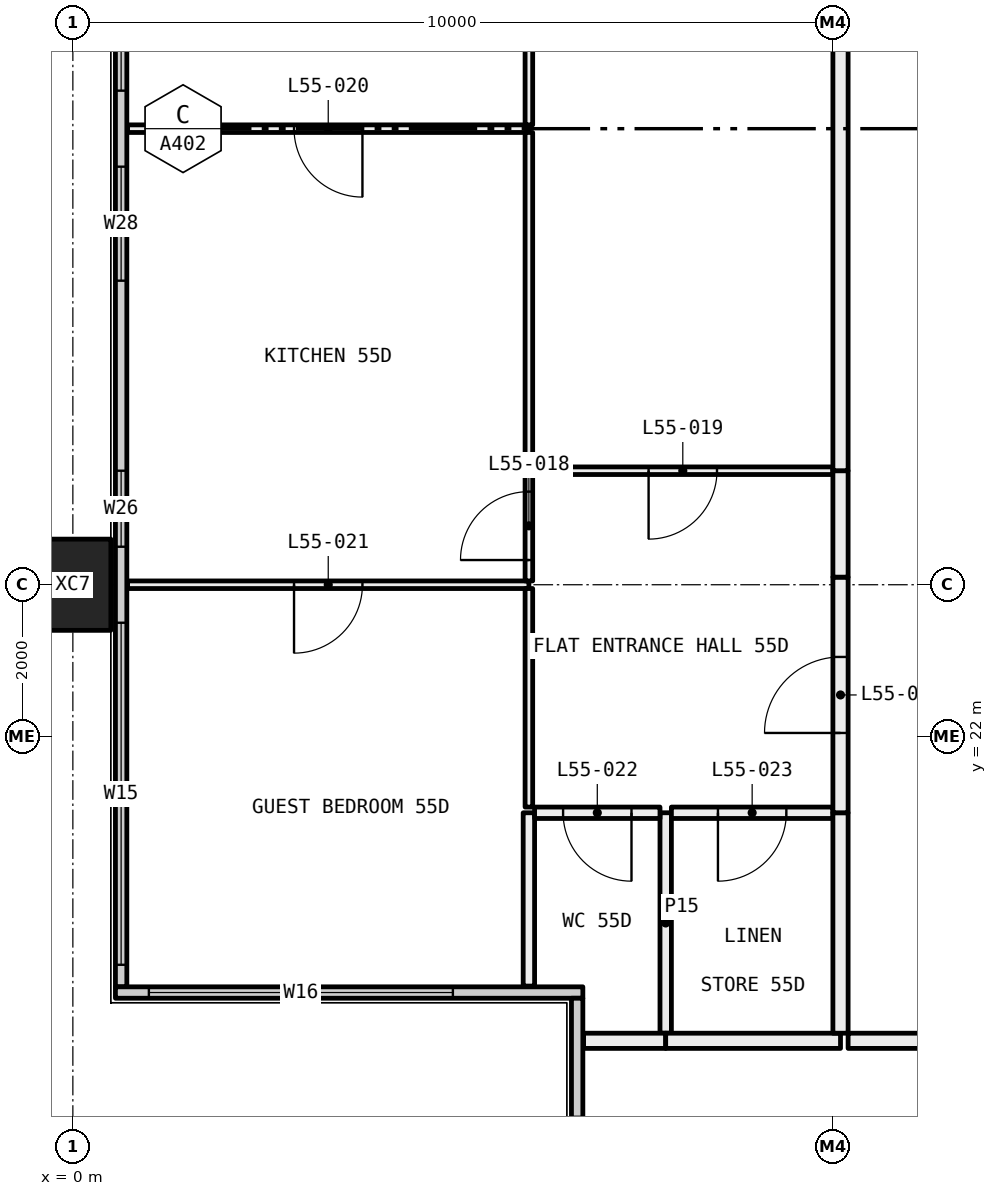
"""IFC4 building model, lengths in metres.
Left out: names, types, materials, properties, quantities, classifications, styles, units other than length and angle.
Written with IfcOpenShell. Run it as: python <this file> out.ifc"""

import sys

from ifc_helpers import new_model, si_unit, direction, frame, frame_2d, origin, origin_2d, place, context, subcontext, project, spatial, rectangle, hollow_rectangle, extrude, element, fill, save


model = new_model("IFC4")
c1 = context("Model", 3, precision=1e-05, world=origin(), true_north=direction((0.0, 1.0)))
c2 = subcontext(c1, "Body", "Model", "MODEL_VIEW")
j1 = project(units=[si_unit("LENGTHUNIT", "METRE"), si_unit("PLANEANGLEUNIT", "RADIAN")], contexts=[c1])
p1 = place(None, origin())
s1 = spatial("IfcSite", under=j1, at=p1, CompositionType="ELEMENT")
p2 = place(p1, origin())
s2 = spatial("IfcBuilding", under=s1, at=p2, CompositionType="ELEMENT")
p3 = place(p2, frame((0.0, 0.0, 206.55)))
s3 = spatial("IfcBuildingStorey", under=s2, at=p3, CompositionType="ELEMENT", Elevation=206.55)
p4 = place(p3, frame((0.0, 24.0, -0.4), z_axis=(0.0, 0.0, 1.0), x_axis=(0.0, 1.0, 0.0)))
e1 = element("IfcColumn", 1, at=p4, inside=s3, PredefinedType="COLUMN", context=c2, shape_type="SweptSolid", body=[
    extrude(hollow_rectangle(XDim=1.2, YDim=1.0, WallThickness=0.045, at=origin_2d()), origin(), (0.0, 0.0, 1.0), 3.45),
])
p5 = place(p3, frame((0.635, 18.71, 0.0), z_axis=(0.0, 0.0, 1.0), x_axis=(0.0, 1.0, 0.0)))
e2 = element("IfcWall", 2, at=p5, inside=s3, PredefinedType="ELEMENTEDWALL", context=c2, shape_type="SweptSolid", body=[
    extrude(rectangle(XDim=22.58, YDim=0.15, at=frame_2d((11.29, 0.0))), origin(), (0.0, 0.0, 1.0), 3.05),
])
p6 = place(p5, frame((0.29, 0.0, 0.45)))
e3 = element("IfcOpeningElement", 3, at=p6, cuts=e2, PredefinedType="OPENING", context=c2, shape_type="SweptSolid", body=[
    extrude(rectangle(XDim=4.5, YDim=2.55, at=frame_2d((2.25, 1.275))), frame((0.0, 0.085, 0.0), z_axis=(0.0, -1.0, 0.0), x_axis=(1.0, 0.0, 0.0)), (0.0, 0.0, 1.0), 0.17),
])
p7 = place(p5, frame((5.79, 0.0, 0.45)))
e4 = element("IfcOpeningElement", 4, at=p7, cuts=e2, PredefinedType="OPENING", context=c2, shape_type="SweptSolid", body=[
    extrude(rectangle(XDim=1.0, YDim=2.55, at=frame_2d((0.5, 1.275))), frame((0.0, 0.085, 0.0), z_axis=(0.0, -1.0, 0.0), x_axis=(1.0, 0.0, 0.0)), (0.0, 0.0, 1.0), 0.17),
])
p8 = place(p5, frame((9.29, 0.0, 0.45)))
e5 = element("IfcOpeningElement", 5, at=p8, cuts=e2, PredefinedType="OPENING", context=c2, shape_type="SweptSolid", body=[
    extrude(rectangle(XDim=1.5, YDim=2.55, at=frame_2d((0.75, 1.275))), frame((0.0, 0.085, 0.0), z_axis=(0.0, -1.0, 0.0), x_axis=(1.0, 0.0, 0.0)), (0.0, 0.0, 1.0), 0.17),
])
p9 = place(p5, frame((11.79, 0.0, 0.45)))
e6 = element("IfcOpeningElement", 6, at=p9, cuts=e2, PredefinedType="OPENING", context=c2, shape_type="SweptSolid", body=[
    extrude(rectangle(XDim=1.5, YDim=2.55, at=frame_2d((0.75, 1.275))), frame((0.0, 0.085, 0.0), z_axis=(0.0, -1.0, 0.0), x_axis=(1.0, 0.0, 0.0)), (0.0, 0.0, 1.0), 0.17),
])
p10 = place(p5, frame((15.79, 0.0, 0.45)))
e7 = element("IfcOpeningElement", 7, at=p10, cuts=e2, PredefinedType="OPENING", context=c2, shape_type="SweptSolid", body=[
    extrude(rectangle(XDim=1.0, YDim=2.55, at=frame_2d((0.5, 1.275))), frame((0.0, 0.085, 0.0), z_axis=(0.0, -1.0, 0.0), x_axis=(1.0, 0.0, 0.0)), (0.0, 0.0, 1.0), 0.17),
])
p11 = place(p5, frame((17.79, 0.0, 0.45)))
e8 = element("IfcOpeningElement", 8, at=p11, cuts=e2, PredefinedType="OPENING", context=c2, shape_type="SweptSolid", body=[
    extrude(rectangle(XDim=4.5, YDim=2.55, at=frame_2d((2.25, 1.275))), frame((0.0, 0.085, 0.0), z_axis=(0.0, -1.0, 0.0), x_axis=(1.0, 0.0, 0.0)), (0.0, 0.0, 1.0), 0.17),
])
p12 = place(p3, frame((0.56, 18.635, 0.0), z_axis=(0.0, 0.0, 1.0), x_axis=(1.0, 0.0, 0.0)))
e9 = element("IfcWall", 9, at=p12, inside=s3, PredefinedType="ELEMENTEDWALL", context=c2, shape_type="SweptSolid", body=[
    extrude(rectangle(XDim=6.15, YDim=0.15, at=frame_2d((3.075, 0.0))), origin(), (0.0, 0.0, 1.0), 3.05),
])
p13 = place(p12, frame((0.44, 0.0, 0.45)))
e10 = element("IfcOpeningElement", 10, at=p13, cuts=e9, PredefinedType="OPENING", context=c2, shape_type="SweptSolid", body=[
    extrude(rectangle(XDim=4.0, YDim=2.55, at=frame_2d((2.0, 1.275))), frame((0.0, 0.085, 0.0), z_axis=(0.0, -1.0, 0.0), x_axis=(1.0, 0.0, 0.0)), (0.0, 0.0, 1.0), 0.17),
])
p14 = place(p3, frame((6.635, 12.71, 0.0), z_axis=(0.0, 0.0, 1.0), x_axis=(0.0, 1.0, 0.0)))
e11 = element("IfcWall", 11, at=p14, inside=s3, PredefinedType="ELEMENTEDWALL", context=c2, shape_type="SweptSolid", body=[
    extrude(rectangle(XDim=5.85, YDim=0.15, at=frame_2d((2.925, 0.0))), origin(), (0.0, 0.0, 1.0), 3.05),
])
p15 = place(p14, frame((0.29, 0.0, 0.45)))
e12 = element("IfcOpeningElement", 12, at=p15, cuts=e11, PredefinedType="OPENING", context=c2, shape_type="SweptSolid", body=[
    extrude(rectangle(XDim=4.0, YDim=2.55, at=frame_2d((2.0, 1.275))), frame((0.0, 0.085, 0.0), z_axis=(0.0, -1.0, 0.0), x_axis=(1.0, 0.0, 0.0)), (0.0, 0.0, 1.0), 0.17),
])
p16 = place(p3, frame((6.0, 24.0, 0.0), z_axis=(0.0, 0.0, 1.0), x_axis=(-1.0, 0.0, 0.0)))
e13 = element("IfcWall", 13, at=p16, inside=s3, PredefinedType="PARTITIONING", context=c2, shape_type="SweptSolid", body=[
    extrude(rectangle(XDim=5.28, YDim=0.1, at=frame_2d((2.64, 0.0))), origin(), (0.0, 0.0, 1.0), 2.45),
])
p17 = place(p16, frame((2.19, 0.0, 0.0)))
e14 = element("IfcOpeningElement", 14, at=p17, cuts=e13, PredefinedType="OPENING", context=c2, shape_type="SweptSolid", body=[
    extrude(rectangle(XDim=0.9, YDim=2.1, at=frame_2d((0.45, 1.05))), frame((0.0, 0.06, 0.0), z_axis=(0.0, -1.0, 0.0), x_axis=(1.0, 0.0, 0.0)), (0.0, 0.0, 1.0), 0.12),
])
p18 = place(p3, frame((6.0, 18.72, 0.0), z_axis=(0.0, 0.0, 1.0), x_axis=(0.0, 1.0, 0.0)))
e15 = element("IfcWall", 15, at=p18, inside=s3, PredefinedType="PARTITIONING", context=c2, shape_type="SweptSolid", body=[
    extrude(rectangle(XDim=2.28, YDim=0.15, at=frame_2d((1.14, 0.0))), origin(), (0.0, 0.0, 1.0), 3.05),
])
p19 = place(p3, frame((6.0, 21.075, 0.0), z_axis=(0.0, 0.0, 1.0), x_axis=(0.0, 1.0, 0.0)))
e16 = element("IfcWall", 16, at=p19, inside=s3, PredefinedType="PARTITIONING", context=c2, shape_type="SweptSolid", body=[
    extrude(rectangle(XDim=2.875, YDim=0.1, at=frame_2d((1.438, 0.0))), origin(), (0.0, 0.0, 1.0), 2.45),
])
p20 = place(p3, frame((6.0, 30.0, 0.0), z_axis=(0.0, 0.0, 1.0), x_axis=(-1.0, 0.0, 0.0)))
e17 = element("IfcWall", 17, at=p20, inside=s3, PredefinedType="PARTITIONING", context=c2, shape_type="SweptSolid", body=[
    extrude(rectangle(XDim=5.28, YDim=0.1, at=frame_2d((2.64, 0.0))), origin(), (0.0, 0.0, 1.0), 3.05),
])
p21 = place(p20, frame((2.19, 0.0, 0.0)))
e18 = element("IfcOpeningElement", 18, at=p21, cuts=e17, PredefinedType="OPENING", context=c2, shape_type="SweptSolid", body=[
    extrude(rectangle(XDim=0.9, YDim=2.1, at=frame_2d((0.45, 1.05))), frame((0.0, 0.06, 0.0), z_axis=(0.0, -1.0, 0.0), x_axis=(1.0, 0.0, 0.0)), (0.0, 0.0, 1.0), 0.12),
])
p22 = place(p3, frame((6.0, 24.05, 0.0), z_axis=(0.0, 0.0, 1.0), x_axis=(0.0, 1.0, 0.0)))
e19 = element("IfcWall", 19, at=p22, inside=s3, PredefinedType="PARTITIONING", context=c2, shape_type="SweptSolid", body=[
    extrude(rectangle(XDim=1.45, YDim=0.1, at=frame_2d((0.725, 0.0))), origin(), (0.0, 0.0, 1.0), 2.45),
])
p23 = place(p22, frame((0.275, 0.0, 0.0)))
e20 = element("IfcOpeningElement", 20, at=p23, cuts=e19, PredefinedType="OPENING", context=c2, shape_type="SweptSolid", body=[
    extrude(rectangle(XDim=0.9, YDim=2.1, at=frame_2d((0.45, 1.05))), frame((0.0, 0.06, 0.0), z_axis=(0.0, -1.0, 0.0), x_axis=(1.0, 0.0, 0.0)), (0.0, 0.0, 1.0), 0.12),
])
p24 = place(p3, frame((6.0, 25.5, 0.0), z_axis=(0.0, 0.0, 1.0), x_axis=(0.0, 1.0, 0.0)))
e21 = element("IfcWall", 21, at=p24, inside=s3, PredefinedType="PARTITIONING", context=c2, shape_type="SweptSolid", body=[
    extrude(rectangle(XDim=4.45, YDim=0.1, at=frame_2d((2.225, 0.0))), origin(), (0.0, 0.0, 1.0), 3.05),
])
p25 = place(p3, frame((6.0, 30.05, 0.0), z_axis=(0.0, 0.0, 1.0), x_axis=(0.0, 1.0, 0.0)))
e22 = element("IfcWall", 22, at=p25, inside=s3, PredefinedType="PARTITIONING", context=c2, shape_type="SweptSolid", body=[
    extrude(rectangle(XDim=6.05, YDim=0.1, at=frame_2d((3.025, 0.0))), origin(), (0.0, 0.0, 1.0), 2.45),
])
p26 = place(p3, frame((7.8, 18.1, 0.0), z_axis=(0.0, 0.0, 1.0), x_axis=(0.0, 1.0, 0.0)))
e23 = element("IfcWall", 23, at=p26, inside=s3, PredefinedType="PARTITIONING", context=c2, shape_type="SweptSolid", body=[
    extrude(rectangle(XDim=2.9, YDim=0.15, at=frame_2d((1.45, 0.0))), origin(), (0.0, 0.0, 1.0), 3.05),
])
p27 = place(p3, frame((7.725, 21.0, 0.0), z_axis=(0.0, 0.0, 1.0), x_axis=(-1.0, 0.0, 0.0)))
e24 = element("IfcWall", 24, at=p27, inside=s3, PredefinedType="PARTITIONING", context=c2, shape_type="SweptSolid", body=[
    extrude(rectangle(XDim=1.65, YDim=0.15, at=frame_2d((0.825, 0.0))), origin(), (0.0, 0.0, 1.0), 3.05),
])
p28 = place(p27, frame((0.375, 0.0, 0.0)))
e25 = element("IfcOpeningElement", 25, at=p28, cuts=e24, PredefinedType="OPENING", context=c2, shape_type="SweptSolid", body=[
    extrude(rectangle(XDim=0.9, YDim=2.1, at=frame_2d((0.45, 1.05))), frame((0.0, 0.085, 0.0), z_axis=(0.0, -1.0, 0.0), x_axis=(1.0, 0.0, 0.0)), (0.0, 0.0, 1.0), 0.17),
])
p29 = place(p3, frame((6.72, 18.0, 0.0), z_axis=(0.0, 0.0, 1.0), x_axis=(1.0, 0.0, 0.0)))
e26 = element("IfcWall", 26, at=p29, inside=s3, PredefinedType="PARTITIONING", context=c2, shape_type="SweptSolid", body=[
    extrude(rectangle(XDim=1.08, YDim=0.2, at=frame_2d((0.54, 0.0))), origin(), (0.0, 0.0, 1.0), 3.05),
])
p30 = place(p3, frame((10.0, 21.0, 0.0), z_axis=(0.0, 0.0, 1.0), x_axis=(-1.0, 0.0, 0.0)))
e27 = element("IfcWall", 27, at=p30, inside=s3, PredefinedType="PARTITIONING", context=c2, shape_type="SweptSolid", body=[
    extrude(rectangle(XDim=2.125, YDim=0.15, at=frame_2d((1.062, 0.0))), origin(), (0.0, 0.0, 1.0), 3.05),
])
p31 = place(p30, frame((0.613, 0.0, 0.0)))
e28 = element("IfcOpeningElement", 28, at=p31, cuts=e27, PredefinedType="OPENING", context=c2, shape_type="SweptSolid", body=[
    extrude(rectangle(XDim=0.9, YDim=2.1, at=frame_2d((0.45, 1.05))), frame((0.0, 0.085, 0.0), z_axis=(0.0, -1.0, 0.0), x_axis=(1.0, 0.0, 0.0)), (0.0, 0.0, 1.0), 0.17),
])
p32 = place(p3, frame((7.8, 18.0, 0.0), z_axis=(0.0, 0.0, 1.0), x_axis=(1.0, 0.0, 0.0)))
e29 = element("IfcWall", 29, at=p32, inside=s3, PredefinedType="PARTITIONING", context=c2, shape_type="SweptSolid", body=[
    extrude(rectangle(XDim=2.3, YDim=0.2, at=frame_2d((1.15, 0.0))), origin(), (0.0, 0.0, 1.0), 3.05),
])
p33 = place(p3, frame((10.1, 18.1, 0.0), z_axis=(0.0, 0.0, 1.0), x_axis=(0.0, 1.0, 0.0)))
e30 = element("IfcWall", 30, at=p33, inside=s3, PredefinedType="PARTITIONING", context=c2, shape_type="SweptSolid", body=[
    extrude(rectangle(XDim=2.9, YDim=0.2, at=frame_2d((1.45, 0.0))), origin(), (0.0, 0.0, 1.0), 3.05),
])
p34 = place(p3, frame((10.0, 25.5, 0.0), z_axis=(0.0, 0.0, 1.0), x_axis=(-1.0, 0.0, 0.0)))
e31 = element("IfcWall", 31, at=p34, inside=s3, PredefinedType="PARTITIONING", context=c2, shape_type="SweptSolid", body=[
    extrude(rectangle(XDim=3.95, YDim=0.1, at=frame_2d((1.975, 0.0))), origin(), (0.0, 0.0, 1.0), 3.05),
])
p35 = place(p34, frame((1.525, 0.0, 0.0)))
e32 = element("IfcOpeningElement", 32, at=p35, cuts=e31, PredefinedType="OPENING", context=c2, shape_type="SweptSolid", body=[
    extrude(rectangle(XDim=0.9, YDim=2.1, at=frame_2d((0.45, 1.05))), frame((0.0, 0.06, 0.0), z_axis=(0.0, -1.0, 0.0), x_axis=(1.0, 0.0, 0.0)), (0.0, 0.0, 1.0), 0.12),
])
p36 = place(p3, frame((10.1, 21.0, 0.0), z_axis=(0.0, 0.0, 1.0), x_axis=(0.0, 1.0, 0.0)))
e33 = element("IfcWall", 33, at=p36, inside=s3, PredefinedType="PARTITIONING", context=c2, shape_type="SweptSolid", body=[
    extrude(rectangle(XDim=3.1, YDim=0.2, at=frame_2d((1.55, 0.0))), origin(), (0.0, 0.0, 1.0), 2.45),
])
p37 = place(p36, frame((1.05, 0.0, 0.0)))
e34 = element("IfcOpeningElement", 34, at=p37, cuts=e33, PredefinedType="OPENING", context=c2, shape_type="SweptSolid", body=[
    extrude(rectangle(XDim=1.0, YDim=2.1, at=frame_2d((0.5, 1.05))), frame((0.0, 0.11, 0.0), z_axis=(0.0, -1.0, 0.0), x_axis=(1.0, 0.0, 0.0)), (0.0, 0.0, 1.0), 0.22),
])
p38 = place(p3, frame((10.1, 24.1, 0.0), z_axis=(0.0, 0.0, 1.0), x_axis=(0.0, 1.0, 0.0)))
e35 = element("IfcWall", 35, at=p38, inside=s3, PredefinedType="PARTITIONING", context=c2, shape_type="SweptSolid", body=[
    extrude(rectangle(XDim=1.4, YDim=0.2, at=frame_2d((0.7, 0.0))), origin(), (0.0, 0.0, 1.0), 3.05),
])
p39 = place(p3, frame((10.1, 25.5, 0.0), z_axis=(0.0, 0.0, 1.0), x_axis=(0.0, 1.0, 0.0)))
e36 = element("IfcWall", 36, at=p39, inside=s3, PredefinedType="PARTITIONING", context=c2, shape_type="SweptSolid", body=[
    extrude(rectangle(XDim=10.6, YDim=0.2, at=frame_2d((5.3, 0.0))), origin(), (0.0, 0.0, 1.0), 2.45),
])
p40 = place(p3, frame((23.9, 18.0, 0.0), z_axis=(0.0, 0.0, 1.0), x_axis=(-1.0, 0.0, 0.0)))
e37 = element("IfcWall", 37, at=p40, inside=s3, PredefinedType="PARTITIONING", context=c2, shape_type="SweptSolid", body=[
    extrude(rectangle(XDim=13.7, YDim=0.2, at=frame_2d((6.85, 0.0))), origin(), (0.0, 0.0, 1.0), 3.05),
])
p41 = place(p40, frame((6.05, 0.0, 0.0)))
e38 = element("IfcOpeningElement", 38, at=p41, cuts=e37, PredefinedType="OPENING", context=c2, shape_type="SweptSolid", body=[
    extrude(rectangle(XDim=1.6, YDim=2.1, at=frame_2d((0.8, 1.05))), frame((0.0, 0.11, 0.0), z_axis=(0.0, -1.0, 0.0), x_axis=(1.0, 0.0, 0.0)), (0.0, 0.0, 1.0), 0.22),
])
p42 = place(p6, origin())
e39 = element("IfcWindow", 39, at=p42, inside=s3, PartitioningType="SINGLE_PANEL", PredefinedType="WINDOW", context=c2, shape_type="SweptSolid", body=[
    extrude(rectangle(XDim=4.5, YDim=2.55, at=frame_2d((2.25, 1.275))), frame((0.0, 0.03, 0.0), z_axis=(0.0, -1.0, 0.0), x_axis=(1.0, 0.0, 0.0)), (0.0, 0.0, 1.0), 0.06),
])
fill(e3, e39)
p43 = place(p7, origin())
e40 = element("IfcWindow", 40, at=p43, inside=s3, PartitioningType="SINGLE_PANEL", PredefinedType="WINDOW", context=c2, shape_type="SweptSolid", body=[
    extrude(rectangle(XDim=1.0, YDim=2.55, at=frame_2d((0.5, 1.275))), frame((0.0, 0.03, 0.0), z_axis=(0.0, -1.0, 0.0), x_axis=(1.0, 0.0, 0.0)), (0.0, 0.0, 1.0), 0.06),
])
fill(e4, e40)
p44 = place(p8, origin())
e41 = element("IfcWindow", 41, at=p44, inside=s3, PartitioningType="SINGLE_PANEL", PredefinedType="WINDOW", context=c2, shape_type="SweptSolid", body=[
    extrude(rectangle(XDim=1.5, YDim=2.55, at=frame_2d((0.75, 1.275))), frame((0.0, 0.03, 0.0), z_axis=(0.0, -1.0, 0.0), x_axis=(1.0, 0.0, 0.0)), (0.0, 0.0, 1.0), 0.06),
])
fill(e5, e41)
p45 = place(p9, origin())
e42 = element("IfcWindow", 42, at=p45, inside=s3, PartitioningType="SINGLE_PANEL", PredefinedType="WINDOW", context=c2, shape_type="SweptSolid", body=[
    extrude(rectangle(XDim=1.5, YDim=2.55, at=frame_2d((0.75, 1.275))), frame((0.0, 0.03, 0.0), z_axis=(0.0, -1.0, 0.0), x_axis=(1.0, 0.0, 0.0)), (0.0, 0.0, 1.0), 0.06),
])
fill(e6, e42)
p46 = place(p13, origin())
e43 = element("IfcWindow", 43, at=p46, inside=s3, PartitioningType="SINGLE_PANEL", PredefinedType="WINDOW", context=c2, shape_type="SweptSolid", body=[
    extrude(rectangle(XDim=4.0, YDim=2.55, at=frame_2d((2.0, 1.275))), frame((0.0, 0.03, 0.0), z_axis=(0.0, -1.0, 0.0), x_axis=(1.0, 0.0, 0.0)), (0.0, 0.0, 1.0), 0.06),
])
fill(e10, e43)
p47 = place(p37, origin())
e44 = element("IfcDoor", 44, at=p47, inside=s3, OperationType="SINGLE_SWING_RIGHT", PredefinedType="DOOR", context=c2, shape_type="SweptSolid", body=[
    extrude(rectangle(XDim=1.0, YDim=2.1, at=frame_2d((0.5, 1.05))), frame((0.0, 0.025, 0.0), z_axis=(0.0, -1.0, 0.0), x_axis=(1.0, 0.0, 0.0)), (0.0, 0.0, 1.0), 0.05),
])
fill(e34, e44)
p48 = place(p23, origin())
e45 = element("IfcDoor", 45, at=p48, inside=s3, OperationType="SINGLE_SWING_RIGHT", PredefinedType="DOOR", context=c2, shape_type="SweptSolid", body=[
    extrude(rectangle(XDim=0.9, YDim=2.1, at=frame_2d((0.45, 1.05))), frame((0.0, 0.025, 0.0), z_axis=(0.0, -1.0, 0.0), x_axis=(1.0, 0.0, 0.0)), (0.0, 0.0, 1.0), 0.05),
])
fill(e20, e45)
p49 = place(p35, origin())
e46 = element("IfcDoor", 46, at=p49, inside=s3, OperationType="SINGLE_SWING_LEFT", PredefinedType="DOOR", context=c2, shape_type="SweptSolid", body=[
    extrude(rectangle(XDim=0.9, YDim=2.1, at=frame_2d((0.45, 1.05))), frame((0.0, 0.025, 0.0), z_axis=(0.0, -1.0, 0.0), x_axis=(1.0, 0.0, 0.0)), (0.0, 0.0, 1.0), 0.05),
])
fill(e32, e46)
p50 = place(p21, origin())
e47 = element("IfcDoor", 47, at=p50, inside=s3, OperationType="SINGLE_SWING_RIGHT", PredefinedType="DOOR", context=c2, shape_type="SweptSolid", body=[
    extrude(rectangle(XDim=0.9, YDim=2.1, at=frame_2d((0.45, 1.05))), frame((0.0, 0.025, 0.0), z_axis=(0.0, -1.0, 0.0), x_axis=(1.0, 0.0, 0.0)), (0.0, 0.0, 1.0), 0.05),
])
fill(e18, e47)
p51 = place(p17, origin())
e48 = element("IfcDoor", 48, at=p51, inside=s3, OperationType="SINGLE_SWING_LEFT", PredefinedType="DOOR", context=c2, shape_type="SweptSolid", body=[
    extrude(rectangle(XDim=0.9, YDim=2.1, at=frame_2d((0.45, 1.05))), frame((0.0, 0.025, 0.0), z_axis=(0.0, -1.0, 0.0), x_axis=(1.0, 0.0, 0.0)), (0.0, 0.0, 1.0), 0.05),
])
fill(e14, e48)
p52 = place(p28, origin())
e49 = element("IfcDoor", 49, at=p52, inside=s3, OperationType="SINGLE_SWING_RIGHT", PredefinedType="DOOR", context=c2, shape_type="SweptSolid", body=[
    extrude(rectangle(XDim=0.9, YDim=2.1, at=frame_2d((0.45, 1.05))), frame((0.0, 0.025, 0.0), z_axis=(0.0, -1.0, 0.0), x_axis=(1.0, 0.0, 0.0)), (0.0, 0.0, 1.0), 0.05),
])
fill(e25, e49)
p53 = place(p31, origin())
e50 = element("IfcDoor", 50, at=p53, inside=s3, OperationType="SINGLE_SWING_LEFT", PredefinedType="DOOR", context=c2, shape_type="SweptSolid", body=[
    extrude(rectangle(XDim=0.9, YDim=2.1, at=frame_2d((0.45, 1.05))), frame((0.0, 0.025, 0.0), z_axis=(0.0, -1.0, 0.0), x_axis=(1.0, 0.0, 0.0)), (0.0, 0.0, 1.0), 0.05),
])
fill(e28, e50)
save(model, sys.argv[1])
